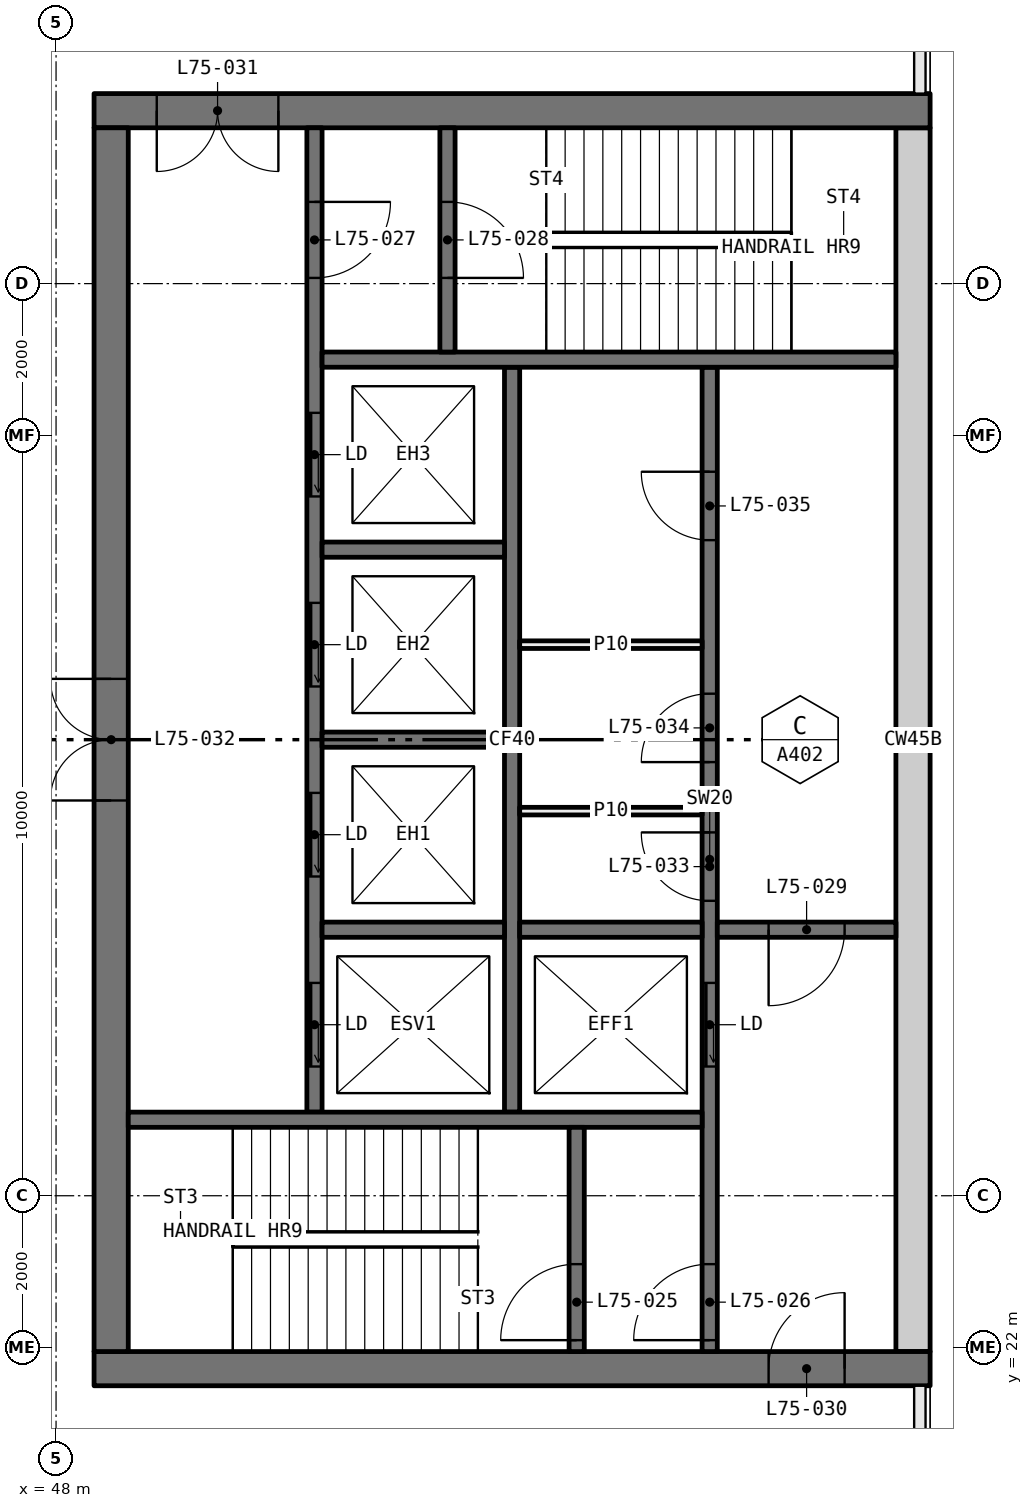
"""IFC4 building model, lengths in metres.
Left out: names, types, materials, properties, quantities, classifications, styles, units other than length and angle.
Written with IfcOpenShell. Run it as: python <this file> out.ifc"""

import sys

from ifc_helpers import new_model, si_unit, direction, frame, frame_2d, origin, place, context, subcontext, project, spatial, rectangle, extrude, element, fill, save


model = new_model("IFC4")
c1 = context("Model", 3, precision=1e-05, world=origin(), true_north=direction((0.0, 1.0)))
c2 = subcontext(c1, "Body", "Model", "MODEL_VIEW")
j1 = project(units=[si_unit("LENGTHUNIT", "METRE"), si_unit("PLANEANGLEUNIT", "RADIAN")], contexts=[c1])
p1 = place(None, origin())
s1 = spatial("IfcSite", under=j1, at=p1, CompositionType="ELEMENT")
p2 = place(p1, origin())
s2 = spatial("IfcBuilding", under=s1, at=p2, CompositionType="ELEMENT")
p3 = place(p2, frame((0.0, 0.0, 277.95)))
s3 = spatial("IfcBuildingStorey", under=s2, at=p3, CompositionType="ELEMENT", Elevation=277.95)
p4 = place(p3, frame((59.5, 21.725, 0.0), z_axis=(0.0, 0.0, 1.0), x_axis=(-1.0, 0.0, 0.0)))
e1 = element("IfcWall", 1, at=p4, inside=s3, PredefinedType="SHEAR", context=c2, shape_type="SweptSolid", body=[
    extrude(rectangle(XDim=11.0, YDim=0.45, at=frame_2d((5.5, 0.0))), origin(), (0.0, 0.0, 1.0), 5.0),
])
p5 = place(p4, frame((1.125, 0.0, 0.0)))
e2 = element("IfcOpeningElement", 2, at=p5, cuts=e1, PredefinedType="OPENING", context=c2, shape_type="SweptSolid", body=[
    extrude(rectangle(XDim=1.0, YDim=2.1, at=frame_2d((0.5, 1.05))), frame((0.0, 0.235, 0.0), z_axis=(0.0, -1.0, 0.0), x_axis=(1.0, 0.0, 0.0)), (0.0, 0.0, 1.0), 0.47),
])
p6 = place(p3, frame((59.5, 38.275, 0.0), z_axis=(0.0, 0.0, 1.0), x_axis=(-1.0, 0.0, 0.0)))
e3 = element("IfcWall", 3, at=p6, inside=s3, PredefinedType="SHEAR", context=c2, shape_type="SweptSolid", body=[
    extrude(rectangle(XDim=11.0, YDim=0.45, at=frame_2d((5.5, 0.0))), origin(), (0.0, 0.0, 1.0), 5.0),
])
p7 = place(p6, frame((8.575, 0.0, 0.0)))
e4 = element("IfcOpeningElement", 4, at=p7, cuts=e3, PredefinedType="OPENING", context=c2, shape_type="SweptSolid", body=[
    extrude(rectangle(XDim=1.6, YDim=2.1, at=frame_2d((0.8, 1.05))), frame((0.0, 0.235, 0.0), z_axis=(0.0, -1.0, 0.0), x_axis=(1.0, 0.0, 0.0)), (0.0, 0.0, 1.0), 0.47),
])
p8 = place(p3, frame((59.275, 21.95, 0.0), z_axis=(0.0, 0.0, 1.0), x_axis=(0.0, 1.0, 0.0)))
e5 = element("IfcWall", 5, at=p8, inside=s3, PredefinedType="SHEAR", context=c2, shape_type="SweptSolid", body=[
    extrude(rectangle(XDim=16.1, YDim=0.45, at=frame_2d((8.05, 0.0))), origin(), (0.0, 0.0, 1.0), 5.0),
])
p9 = place(p3, frame((48.725, 21.95, 0.0), z_axis=(0.0, 0.0, 1.0), x_axis=(0.0, 1.0, 0.0)))
e6 = element("IfcWall", 6, at=p9, inside=s3, PredefinedType="SHEAR", context=c2, shape_type="SweptSolid", body=[
    extrude(rectangle(XDim=16.1, YDim=0.45, at=frame_2d((8.05, 0.0))), origin(), (0.0, 0.0, 1.0), 5.0),
])
p10 = place(p9, frame((7.25, 0.0, 0.0)))
e7 = element("IfcOpeningElement", 7, at=p10, cuts=e6, PredefinedType="OPENING", context=c2, shape_type="SweptSolid", body=[
    extrude(rectangle(XDim=1.6, YDim=2.1, at=frame_2d((0.8, 1.05))), frame((0.0, 0.235, 0.0), z_axis=(0.0, -1.0, 0.0), x_axis=(1.0, 0.0, 0.0)), (0.0, 0.0, 1.0), 0.47),
])
p11 = place(p3, frame((56.6, 21.95, 0.0), z_axis=(0.0, 0.0, 1.0), x_axis=(0.0, 1.0, 0.0)))
e8 = element("IfcWall", 8, at=p11, inside=s3, PredefinedType="SOLIDWALL", context=c2, shape_type="SweptSolid", body=[
    extrude(rectangle(XDim=12.95, YDim=0.2, at=frame_2d((6.475, 0.0))), origin(), (0.0, 0.0, 1.0), 5.0),
])
p12 = place(p11, frame((3.75, 0.0, 0.0)))
e9 = element("IfcOpeningElement", 9, at=p12, cuts=e8, PredefinedType="OPENING", context=c2, shape_type="SweptSolid", body=[
    extrude(rectangle(XDim=1.1, YDim=2.1, at=frame_2d((0.55, 1.05))), frame((0.0, 0.11, 0.0), z_axis=(0.0, -1.0, 0.0), x_axis=(1.0, 0.0, 0.0)), (0.0, 0.0, 1.0), 0.22),
])
p13 = place(p11, frame((0.15, 0.0, 0.0)))
e10 = element("IfcOpeningElement", 10, at=p13, cuts=e8, PredefinedType="OPENING", context=c2, shape_type="SweptSolid", body=[
    extrude(rectangle(XDim=1.0, YDim=2.1, at=frame_2d((0.5, 1.05))), frame((0.0, 0.11, 0.0), z_axis=(0.0, -1.0, 0.0), x_axis=(1.0, 0.0, 0.0)), (0.0, 0.0, 1.0), 0.22),
])
p14 = place(p11, frame((5.93, 0.0, 0.0)))
e11 = element("IfcOpeningElement", 11, at=p14, cuts=e8, PredefinedType="OPENING", context=c2, shape_type="SweptSolid", body=[
    extrude(rectangle(XDim=0.9, YDim=2.1, at=frame_2d((0.45, 1.05))), frame((0.0, 0.11, 0.0), z_axis=(0.0, -1.0, 0.0), x_axis=(1.0, 0.0, 0.0)), (0.0, 0.0, 1.0), 0.22),
])
p15 = place(p11, frame((7.755, 0.0, 0.0)))
e12 = element("IfcOpeningElement", 12, at=p15, cuts=e8, PredefinedType="OPENING", context=c2, shape_type="SweptSolid", body=[
    extrude(rectangle(XDim=0.9, YDim=2.1, at=frame_2d((0.45, 1.05))), frame((0.0, 0.11, 0.0), z_axis=(0.0, -1.0, 0.0), x_axis=(1.0, 0.0, 0.0)), (0.0, 0.0, 1.0), 0.22),
])
p16 = place(p11, frame((10.675, 0.0, 0.0)))
e13 = element("IfcOpeningElement", 13, at=p16, cuts=e8, PredefinedType="OPENING", context=c2, shape_type="SweptSolid", body=[
    extrude(rectangle(XDim=0.9, YDim=2.1, at=frame_2d((0.45, 1.05))), frame((0.0, 0.11, 0.0), z_axis=(0.0, -1.0, 0.0), x_axis=(1.0, 0.0, 0.0)), (0.0, 0.0, 1.0), 0.22),
])
p17 = place(p3, frame((51.4, 25.1, 0.0), z_axis=(0.0, 0.0, 1.0), x_axis=(0.0, 1.0, 0.0)))
e14 = element("IfcWall", 14, at=p17, inside=s3, PredefinedType="SOLIDWALL", context=c2, shape_type="SweptSolid", body=[
    extrude(rectangle(XDim=12.95, YDim=0.2, at=frame_2d((6.475, 0.0))), origin(), (0.0, 0.0, 1.0), 5.0),
])
p18 = place(p17, frame((0.6, 0.0, 0.0)))
e15 = element("IfcOpeningElement", 15, at=p18, cuts=e14, PredefinedType="OPENING", context=c2, shape_type="SweptSolid", body=[
    extrude(rectangle(XDim=1.1, YDim=2.1, at=frame_2d((0.55, 1.05))), frame((0.0, 0.11, 0.0), z_axis=(0.0, -1.0, 0.0), x_axis=(1.0, 0.0, 0.0)), (0.0, 0.0, 1.0), 0.22),
])
p19 = place(p17, frame((3.1, 0.0, 0.0)))
e16 = element("IfcOpeningElement", 16, at=p19, cuts=e14, PredefinedType="OPENING", context=c2, shape_type="SweptSolid", body=[
    extrude(rectangle(XDim=1.1, YDim=2.1, at=frame_2d((0.55, 1.05))), frame((0.0, 0.11, 0.0), z_axis=(0.0, -1.0, 0.0), x_axis=(1.0, 0.0, 0.0)), (0.0, 0.0, 1.0), 0.22),
])
p20 = place(p17, frame((5.6, 0.0, 0.0)))
e17 = element("IfcOpeningElement", 17, at=p20, cuts=e14, PredefinedType="OPENING", context=c2, shape_type="SweptSolid", body=[
    extrude(rectangle(XDim=1.1, YDim=2.1, at=frame_2d((0.55, 1.05))), frame((0.0, 0.11, 0.0), z_axis=(0.0, -1.0, 0.0), x_axis=(1.0, 0.0, 0.0)), (0.0, 0.0, 1.0), 0.22),
])
p21 = place(p17, frame((8.1, 0.0, 0.0)))
e18 = element("IfcOpeningElement", 18, at=p21, cuts=e14, PredefinedType="OPENING", context=c2, shape_type="SweptSolid", body=[
    extrude(rectangle(XDim=1.1, YDim=2.1, at=frame_2d((0.55, 1.05))), frame((0.0, 0.11, 0.0), z_axis=(0.0, -1.0, 0.0), x_axis=(1.0, 0.0, 0.0)), (0.0, 0.0, 1.0), 0.22),
])
p22 = place(p17, frame((10.975, 0.0, 0.0)))
e19 = element("IfcOpeningElement", 19, at=p22, cuts=e14, PredefinedType="OPENING", context=c2, shape_type="SweptSolid", body=[
    extrude(rectangle(XDim=1.0, YDim=2.1, at=frame_2d((0.5, 1.05))), frame((0.0, 0.11, 0.0), z_axis=(0.0, -1.0, 0.0), x_axis=(1.0, 0.0, 0.0)), (0.0, 0.0, 1.0), 0.22),
])
p23 = place(p3, frame((54.0, 25.1, 0.0), z_axis=(0.0, 0.0, 1.0), x_axis=(0.0, 1.0, 0.0)))
e20 = element("IfcWall", 20, at=p23, inside=s3, PredefinedType="SOLIDWALL", context=c2, shape_type="SweptSolid", body=[
    extrude(rectangle(XDim=9.8, YDim=0.2, at=frame_2d((4.9, 0.0))), origin(), (0.0, 0.0, 1.0), 5.0),
])
for number, where, z_axis, x_axis in (
    (21, (56.5, 25.0, 0.0), (0.0, 0.0, 1.0), (-1.0, 0.0, 0.0)),
    (22, (59.05, 35.0, 0.0), (0.0, 0.0, 1.0), (-1.0, 0.0, 0.0)),
):
    element("IfcWall", number, at=place(p3, frame(where, z_axis=z_axis, x_axis=x_axis)), inside=s3, PredefinedType="SOLIDWALL", context=c2, shape_type="SweptSolid", body=[
        extrude(rectangle(XDim=7.55, YDim=0.2, at=frame_2d((3.775, 0.0))), origin(), (0.0, 0.0, 1.0), 5.0),
    ])
p24 = place(p3, frame((59.05, 27.5, 0.0), z_axis=(0.0, 0.0, 1.0), x_axis=(-1.0, 0.0, 0.0)))
e23 = element("IfcWall", 23, at=p24, inside=s3, PredefinedType="SOLIDWALL", context=c2, shape_type="SweptSolid", body=[
    extrude(rectangle(XDim=2.35, YDim=0.2, at=frame_2d((1.175, 0.0))), origin(), (0.0, 0.0, 1.0), 5.0),
])
p25 = place(p24, frame((0.675, 0.0, 0.0)))
e24 = element("IfcOpeningElement", 24, at=p25, cuts=e23, PredefinedType="OPENING", context=c2, shape_type="SweptSolid", body=[
    extrude(rectangle(XDim=1.0, YDim=2.1, at=frame_2d((0.5, 1.05))), frame((0.0, 0.11, 0.0), z_axis=(0.0, -1.0, 0.0), x_axis=(1.0, 0.0, 0.0)), (0.0, 0.0, 1.0), 0.22),
])
p26 = place(p3, frame((54.85, 21.95, 0.0), z_axis=(0.0, 0.0, 1.0), x_axis=(0.0, 1.0, 0.0)))
e25 = element("IfcWall", 25, at=p26, inside=s3, PredefinedType="SOLIDWALL", context=c2, shape_type="SweptSolid", body=[
    extrude(rectangle(XDim=2.95, YDim=0.2, at=frame_2d((1.475, 0.0))), origin(), (0.0, 0.0, 1.0), 5.0),
])
p27 = place(p26, frame((0.15, 0.0, 0.0)))
e26 = element("IfcOpeningElement", 26, at=p27, cuts=e25, PredefinedType="OPENING", context=c2, shape_type="SweptSolid", body=[
    extrude(rectangle(XDim=1.0, YDim=2.1, at=frame_2d((0.5, 1.05))), frame((0.0, 0.11, 0.0), z_axis=(0.0, -1.0, 0.0), x_axis=(1.0, 0.0, 0.0)), (0.0, 0.0, 1.0), 0.22),
])
p28 = place(p3, frame((53.15, 35.1, 0.0), z_axis=(0.0, 0.0, 1.0), x_axis=(0.0, 1.0, 0.0)))
e27 = element("IfcWall", 27, at=p28, inside=s3, PredefinedType="SOLIDWALL", context=c2, shape_type="SweptSolid", body=[
    extrude(rectangle(XDim=2.95, YDim=0.2, at=frame_2d((1.475, 0.0))), origin(), (0.0, 0.0, 1.0), 5.0),
])
p29 = place(p28, frame((0.975, 0.0, 0.0)))
e28 = element("IfcOpeningElement", 28, at=p29, cuts=e27, PredefinedType="OPENING", context=c2, shape_type="SweptSolid", body=[
    extrude(rectangle(XDim=1.0, YDim=2.1, at=frame_2d((0.5, 1.05))), frame((0.0, 0.11, 0.0), z_axis=(0.0, -1.0, 0.0), x_axis=(1.0, 0.0, 0.0)), (0.0, 0.0, 1.0), 0.22),
])
for number, where, z_axis, x_axis in (
    (29, (56.5, 27.5, 0.0), (0.0, 0.0, 1.0), (-1.0, 0.0, 0.0)),
    (30, (53.9, 27.5, 0.0), (0.0, 0.0, 1.0), (-1.0, 0.0, 0.0)),
    (31, (53.9, 30.0, 0.0), (0.0, 0.0, 1.0), (-1.0, 0.0, 0.0)),
    (32, (53.9, 32.5, 0.0), (0.0, 0.0, 1.0), (-1.0, 0.0, 0.0)),
):
    element("IfcWall", number, at=place(p3, frame(where, z_axis=z_axis, x_axis=x_axis)), inside=s3, PredefinedType="SOLIDWALL", context=c2, shape_type="SweptSolid", body=[
        extrude(rectangle(XDim=2.4, YDim=0.2, at=frame_2d((1.2, 0.0))), origin(), (0.0, 0.0, 1.0), 5.0),
    ])
for number, where, z_axis, x_axis in (
    (33, (56.5, 29.06, 0.0), (0.0, 0.0, 1.0), (-1.0, 0.0, 0.0)),
    (34, (56.5, 31.25, 0.0), (0.0, 0.0, 1.0), (-1.0, 0.0, 0.0)),
):
    element("IfcWall", number, at=place(p3, frame(where, z_axis=z_axis, x_axis=x_axis)), inside=s3, PredefinedType="PARTITIONING", context=c2, shape_type="SweptSolid", body=[
        extrude(rectangle(XDim=2.4, YDim=0.1, at=frame_2d((1.2, 0.0))), origin(), (0.0, 0.0, 1.0), 5.0),
    ])
p30 = place(p18, origin())
e35 = element("IfcDoor", 35, at=p30, inside=s3, OperationType="SLIDING_TO_LEFT", PredefinedType="DOOR", context=c2, shape_type="SweptSolid", body=[
    extrude(rectangle(XDim=1.1, YDim=2.1, at=frame_2d((0.55, 1.05))), frame((0.0, 0.025, 0.0), z_axis=(0.0, -1.0, 0.0), x_axis=(1.0, 0.0, 0.0)), (0.0, 0.0, 1.0), 0.05),
])
fill(e15, e35)
p31 = place(p19, origin())
e36 = element("IfcDoor", 36, at=p31, inside=s3, OperationType="SLIDING_TO_LEFT", PredefinedType="DOOR", context=c2, shape_type="SweptSolid", body=[
    extrude(rectangle(XDim=1.1, YDim=2.1, at=frame_2d((0.55, 1.05))), frame((0.0, 0.025, 0.0), z_axis=(0.0, -1.0, 0.0), x_axis=(1.0, 0.0, 0.0)), (0.0, 0.0, 1.0), 0.05),
])
fill(e16, e36)
p32 = place(p20, origin())
e37 = element("IfcDoor", 37, at=p32, inside=s3, OperationType="SLIDING_TO_LEFT", PredefinedType="DOOR", context=c2, shape_type="SweptSolid", body=[
    extrude(rectangle(XDim=1.1, YDim=2.1, at=frame_2d((0.55, 1.05))), frame((0.0, 0.025, 0.0), z_axis=(0.0, -1.0, 0.0), x_axis=(1.0, 0.0, 0.0)), (0.0, 0.0, 1.0), 0.05),
])
fill(e17, e37)
p33 = place(p21, origin())
e38 = element("IfcDoor", 38, at=p33, inside=s3, OperationType="SLIDING_TO_LEFT", PredefinedType="DOOR", context=c2, shape_type="SweptSolid", body=[
    extrude(rectangle(XDim=1.1, YDim=2.1, at=frame_2d((0.55, 1.05))), frame((0.0, 0.025, 0.0), z_axis=(0.0, -1.0, 0.0), x_axis=(1.0, 0.0, 0.0)), (0.0, 0.0, 1.0), 0.05),
])
fill(e18, e38)
p34 = place(p12, origin())
e39 = element("IfcDoor", 39, at=p34, inside=s3, OperationType="SLIDING_TO_LEFT", PredefinedType="DOOR", context=c2, shape_type="SweptSolid", body=[
    extrude(rectangle(XDim=1.1, YDim=2.1, at=frame_2d((0.55, 1.05))), frame((0.0, 0.025, 0.0), z_axis=(0.0, -1.0, 0.0), x_axis=(1.0, 0.0, 0.0)), (0.0, 0.0, 1.0), 0.05),
])
fill(e9, e39)
p35 = place(p27, origin())
e40 = element("IfcDoor", 40, at=p35, inside=s3, OperationType="SINGLE_SWING_RIGHT", PredefinedType="DOOR", context=c2, shape_type="SweptSolid", body=[
    extrude(rectangle(XDim=1.0, YDim=2.1, at=frame_2d((0.5, 1.05))), frame((0.0, 0.025, 0.0), z_axis=(0.0, -1.0, 0.0), x_axis=(1.0, 0.0, 0.0)), (0.0, 0.0, 1.0), 0.05),
])
fill(e26, e40)
p36 = place(p13, origin())
e41 = element("IfcDoor", 41, at=p36, inside=s3, OperationType="SINGLE_SWING_RIGHT", PredefinedType="DOOR", context=c2, shape_type="SweptSolid", body=[
    extrude(rectangle(XDim=1.0, YDim=2.1, at=frame_2d((0.5, 1.05))), frame((0.0, 0.025, 0.0), z_axis=(0.0, -1.0, 0.0), x_axis=(1.0, 0.0, 0.0)), (0.0, 0.0, 1.0), 0.05),
])
fill(e10, e41)
p37 = place(p22, frame((1.0, 0.0, 0.0), x_axis=(-1.0, 0.0, 0.0)))
e42 = element("IfcDoor", 42, at=p37, inside=s3, OperationType="SINGLE_SWING_RIGHT", PredefinedType="DOOR", context=c2, shape_type="SweptSolid", body=[
    extrude(rectangle(XDim=1.0, YDim=2.1, at=frame_2d((0.5, 1.05))), frame((0.0, 0.025, 0.0), z_axis=(0.0, -1.0, 0.0), x_axis=(1.0, 0.0, 0.0)), (0.0, 0.0, 1.0), 0.05),
])
fill(e19, e42)
p38 = place(p29, frame((1.0, 0.0, 0.0), x_axis=(-1.0, 0.0, 0.0)))
e43 = element("IfcDoor", 43, at=p38, inside=s3, OperationType="SINGLE_SWING_LEFT", PredefinedType="DOOR", context=c2, shape_type="SweptSolid", body=[
    extrude(rectangle(XDim=1.0, YDim=2.1, at=frame_2d((0.5, 1.05))), frame((0.0, 0.025, 0.0), z_axis=(0.0, -1.0, 0.0), x_axis=(1.0, 0.0, 0.0)), (0.0, 0.0, 1.0), 0.05),
])
fill(e28, e43)
p39 = place(p25, origin())
e44 = element("IfcDoor", 44, at=p39, inside=s3, OperationType="SINGLE_SWING_LEFT", PredefinedType="DOOR", context=c2, shape_type="SweptSolid", body=[
    extrude(rectangle(XDim=1.0, YDim=2.1, at=frame_2d((0.5, 1.05))), frame((0.0, 0.025, 0.0), z_axis=(0.0, -1.0, 0.0), x_axis=(1.0, 0.0, 0.0)), (0.0, 0.0, 1.0), 0.05),
])
fill(e24, e44)
p40 = place(p5, frame((1.0, 0.0, 0.0), x_axis=(-1.0, 0.0, 0.0)))
e45 = element("IfcDoor", 45, at=p40, inside=s3, OperationType="SINGLE_SWING_LEFT", PredefinedType="DOOR", context=c2, shape_type="SweptSolid", body=[
    extrude(rectangle(XDim=1.0, YDim=2.1, at=frame_2d((0.5, 1.05))), frame((0.0, 0.025, 0.0), z_axis=(0.0, -1.0, 0.0), x_axis=(1.0, 0.0, 0.0)), (0.0, 0.0, 1.0), 0.05),
])
fill(e2, e45)
p41 = place(p7, origin())
e46 = element("IfcDoor", 46, at=p41, inside=s3, OperationType="DOUBLE_DOOR_SINGLE_SWING", PredefinedType="DOOR", context=c2, shape_type="SweptSolid", body=[
    extrude(rectangle(XDim=1.6, YDim=2.1, at=frame_2d((0.8, 1.05))), frame((0.0, 0.025, 0.0), z_axis=(0.0, -1.0, 0.0), x_axis=(1.0, 0.0, 0.0)), (0.0, 0.0, 1.0), 0.05),
])
fill(e4, e46)
p42 = place(p10, origin())
e47 = element("IfcDoor", 47, at=p42, inside=s3, OperationType="DOUBLE_DOOR_SINGLE_SWING", PredefinedType="DOOR", context=c2, shape_type="SweptSolid", body=[
    extrude(rectangle(XDim=1.6, YDim=2.1, at=frame_2d((0.8, 1.05))), frame((0.0, 0.025, 0.0), z_axis=(0.0, -1.0, 0.0), x_axis=(1.0, 0.0, 0.0)), (0.0, 0.0, 1.0), 0.05),
])
fill(e7, e47)
p43 = place(p14, origin())
e48 = element("IfcDoor", 48, at=p43, inside=s3, OperationType="SINGLE_SWING_LEFT", PredefinedType="DOOR", context=c2, shape_type="SweptSolid", body=[
    extrude(rectangle(XDim=0.9, YDim=2.1, at=frame_2d((0.45, 1.05))), frame((0.0, 0.025, 0.0), z_axis=(0.0, -1.0, 0.0), x_axis=(1.0, 0.0, 0.0)), (0.0, 0.0, 1.0), 0.05),
])
fill(e11, e48)
p44 = place(p15, origin())
e49 = element("IfcDoor", 49, at=p44, inside=s3, OperationType="SINGLE_SWING_RIGHT", PredefinedType="DOOR", context=c2, shape_type="SweptSolid", body=[
    extrude(rectangle(XDim=0.9, YDim=2.1, at=frame_2d((0.45, 1.05))), frame((0.0, 0.025, 0.0), z_axis=(0.0, -1.0, 0.0), x_axis=(1.0, 0.0, 0.0)), (0.0, 0.0, 1.0), 0.05),
])
fill(e12, e49)
p45 = place(p16, origin())
e50 = element("IfcDoor", 50, at=p45, inside=s3, OperationType="SINGLE_SWING_LEFT", PredefinedType="DOOR", context=c2, shape_type="SweptSolid", body=[
    extrude(rectangle(XDim=0.9, YDim=2.1, at=frame_2d((0.45, 1.05))), frame((0.0, 0.025, 0.0), z_axis=(0.0, -1.0, 0.0), x_axis=(1.0, 0.0, 0.0)), (0.0, 0.0, 1.0), 0.05),
])
fill(e13, e50)
save(model, sys.argv[1])
